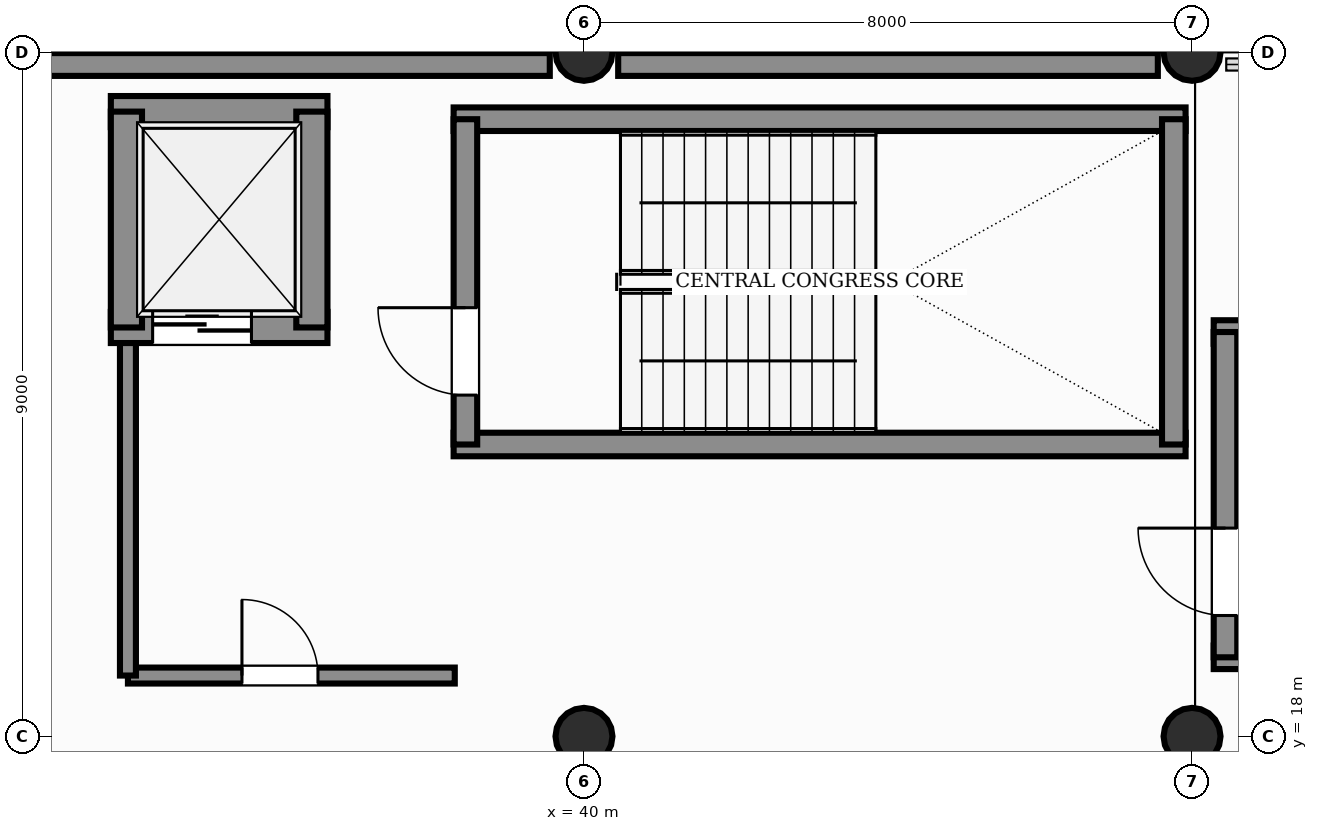
"""IFC4 building model, lengths in metres.
Left out: names, types, materials, properties, quantities, classifications, styles, units other than length and angle.
Written with IfcOpenShell. Run it as: python <this file> out.ifc"""

import sys

from ifc_helpers import new_model, si_unit, direction, frame, frame_2d, origin, origin_2d, place, context, subcontext, project, spatial, rectangle, circle, extrude, element, fill, save


model = new_model("IFC4")
c1 = context("Model", 3, precision=1e-05, world=origin(), true_north=direction((0.0, 1.0)))
c2 = subcontext(c1, "Body", "Model", "MODEL_VIEW")
j1 = project(units=[si_unit("LENGTHUNIT", "METRE"), si_unit("PLANEANGLEUNIT", "RADIAN")], contexts=[c1])
p1 = place(None, origin())
s1 = spatial("IfcSite", under=j1, at=p1, CompositionType="ELEMENT")
p2 = place(p1, origin())
s2 = spatial("IfcBuilding", under=s1, at=p2, CompositionType="ELEMENT")
p3 = place(p2, frame((0.0, 0.0, 16.2)))
s3 = spatial("IfcBuildingStorey", under=s2, at=p3, CompositionType="ELEMENT", Elevation=16.2)
for number, where, z_axis, x_axis in (
    (1, (40.0, 18.0, 0.0), (0.0, 0.0, 1.0), (1.0, 0.0, 0.0)),
    (2, (40.0, 27.0, 0.0), (0.0, 0.0, 1.0), (1.0, 0.0, 0.0)),
    (3, (48.0, 18.0, 0.0), (0.0, 0.0, 1.0), (1.0, 0.0, 0.0)),
    (4, (48.0, 27.0, 0.0), (0.0, 0.0, 1.0), (1.0, 0.0, 0.0)),
):
    element("IfcColumn", number, at=place(p3, frame(where, z_axis=z_axis, x_axis=x_axis)), inside=s3, PredefinedType="COLUMN", context=c2, shape_type="SweptSolid", body=[
        extrude(circle(Radius=0.375, at=origin_2d()), origin(), (0.0, 0.0, 1.0), 4.8),
    ])
for number, where, z_axis, x_axis in (
    (5, (32.45, 26.84, 0.0), (0.0, 0.0, 1.0), (1.0, 0.0, 0.0)),
    (6, (40.45, 26.84, 0.0), (0.0, 0.0, 1.0), (1.0, 0.0, 0.0)),
):
    element("IfcWall", number, at=place(p3, frame(where, z_axis=z_axis, x_axis=x_axis)), inside=s3, PredefinedType="SOLIDWALL", context=c2, shape_type="SweptSolid", body=[
        extrude(rectangle(XDim=7.1, YDim=0.3, at=frame_2d((3.55, 0.0))), origin(), (0.0, 0.0, 1.0), 3.6),
    ])
for number, where, z_axis, x_axis in (
    (7, (38.285, 21.84, 0.0), (0.0, 0.0, 1.0), (1.0, 0.0, 0.0)),
    (8, (38.285, 26.12, 0.0), (0.0, 0.0, 1.0), (1.0, 0.0, 0.0)),
):
    element("IfcWall", number, at=place(p3, frame(where, z_axis=z_axis, x_axis=x_axis)), inside=s3, PredefinedType="SHEAR", context=c2, shape_type="SweptSolid", body=[
        extrude(rectangle(XDim=9.63, YDim=0.31, at=frame_2d((4.815, 0.0))), origin(), (0.0, 0.0, 1.0), 4.8),
    ])
p4 = place(p3, frame((38.44, 21.84, 0.0), z_axis=(0.0, 0.0, 1.0), x_axis=(0.0, 1.0, 0.0)))
e9 = element("IfcWall", 9, at=p4, inside=s3, PredefinedType="SHEAR", context=c2, shape_type="SweptSolid", body=[
    extrude(rectangle(XDim=4.28, YDim=0.31, at=frame_2d((2.14, 0.0))), origin(), (0.0, 0.0, 1.0), 4.8),
])
p5 = place(p4, frame((0.65, 0.0, 0.0)))
e10 = element("IfcOpeningElement", 10, at=p5, cuts=e9, PredefinedType="OPENING", context=c2, shape_type="SweptSolid", body=[
    extrude(rectangle(XDim=1.15, YDim=2.2, at=frame_2d((0.575, 1.1))), frame((0.0, 0.165, 0.0), z_axis=(0.0, -1.0, 0.0), x_axis=(1.0, 0.0, 0.0)), (0.0, 0.0, 1.0), 0.33),
])
p6 = place(p3, frame((47.76, 21.84, 0.0), z_axis=(0.0, 0.0, 1.0), x_axis=(0.0, 1.0, 0.0)))
e11 = element("IfcWall", 11, at=p6, inside=s3, PredefinedType="SHEAR", context=c2, shape_type="SweptSolid", body=[
    extrude(rectangle(XDim=4.28, YDim=0.31, at=frame_2d((2.14, 0.0))), origin(), (0.0, 0.0, 1.0), 4.8),
])
p7 = place(p3, frame((34.0, 18.8, 0.0), z_axis=(0.0, 0.0, 1.0), x_axis=(1.0, 0.0, 0.0)))
e12 = element("IfcWall", 12, at=p7, inside=s3, PredefinedType="PARTITIONING", context=c2, shape_type="SweptSolid", body=[
    extrude(rectangle(XDim=4.3, YDim=0.21, at=frame_2d((2.15, 0.0))), origin(), (0.0, 0.0, 1.0), 3.55),
])
p8 = place(p7, frame((1.5, 0.0, 0.0)))
e13 = element("IfcOpeningElement", 13, at=p8, cuts=e12, PredefinedType="OPENING", context=c2, shape_type="SweptSolid", body=[
    extrude(rectangle(XDim=1.0, YDim=2.15, at=frame_2d((0.5, 1.075))), frame((0.0, 0.115, 0.0), z_axis=(0.0, -1.0, 0.0), x_axis=(1.0, 0.0, 0.0)), (0.0, 0.0, 1.0), 0.23),
])
p9 = place(p3, frame((34.0, 18.8, 0.0), z_axis=(0.0, 0.0, 1.0), x_axis=(0.0, 1.0, 0.0)))
e14 = element("IfcWall", 14, at=p9, inside=s3, PredefinedType="PARTITIONING", context=c2, shape_type="SweptSolid", body=[
    extrude(rectangle(XDim=4.6, YDim=0.21, at=frame_2d((2.3, 0.0))), origin(), (0.0, 0.0, 1.0), 3.55),
])
p10 = place(p3, frame((33.775, 23.38, 0.0), z_axis=(0.0, 0.0, 1.0), x_axis=(1.0, 0.0, 0.0)))
e15 = element("IfcWall", 15, at=p10, inside=s3, PredefinedType="SHEAR", context=c2, shape_type="SweptSolid", body=[
    extrude(rectangle(XDim=2.85, YDim=0.41, at=frame_2d((1.425, 0.0))), origin(), (0.0, 0.0, 1.0), 4.8),
])
p11 = place(p10, frame((0.55, 0.0, 0.0)))
e16 = element("IfcOpeningElement", 16, at=p11, cuts=e15, PredefinedType="OPENING", context=c2, shape_type="SweptSolid", body=[
    extrude(rectangle(XDim=1.3, YDim=2.25, at=frame_2d((0.65, 1.125))), frame((0.0, 0.215, 0.0), z_axis=(0.0, -1.0, 0.0), x_axis=(1.0, 0.0, 0.0)), (0.0, 0.0, 1.0), 0.43),
])
p12 = place(p3, frame((33.775, 26.22, 0.0), z_axis=(0.0, 0.0, 1.0), x_axis=(1.0, 0.0, 0.0)))
e17 = element("IfcWall", 17, at=p12, inside=s3, PredefinedType="SHEAR", context=c2, shape_type="SweptSolid", body=[
    extrude(rectangle(XDim=2.85, YDim=0.41, at=frame_2d((1.425, 0.0))), origin(), (0.0, 0.0, 1.0), 4.8),
])
for number, where, z_axis, x_axis in (
    (18, (33.98, 23.38, 0.0), (0.0, 0.0, 1.0), (0.0, 1.0, 0.0)),
    (19, (36.42, 23.38, 0.0), (0.0, 0.0, 1.0), (0.0, 1.0, 0.0)),
):
    element("IfcWall", number, at=place(p3, frame(where, z_axis=z_axis, x_axis=x_axis)), inside=s3, PredefinedType="SHEAR", context=c2, shape_type="SweptSolid", body=[
        extrude(rectangle(XDim=2.84, YDim=0.41, at=frame_2d((1.42, 0.0))), origin(), (0.0, 0.0, 1.0), 4.8),
    ])
for number, where, z_axis, x_axis in (
    (20, (48.285, 19.04, 0.0), (0.0, 0.0, 1.0), (1.0, 0.0, 0.0)),
    (21, (48.285, 23.32, 0.0), (0.0, 0.0, 1.0), (1.0, 0.0, 0.0)),
):
    element("IfcWall", number, at=place(p3, frame(where, z_axis=z_axis, x_axis=x_axis)), inside=s3, PredefinedType="SHEAR", context=c2, shape_type="SweptSolid", body=[
        extrude(rectangle(XDim=9.63, YDim=0.31, at=frame_2d((4.815, 0.0))), origin(), (0.0, 0.0, 1.0), 4.8),
    ])
p13 = place(p3, frame((48.44, 19.04, 0.0), z_axis=(0.0, 0.0, 1.0), x_axis=(0.0, 1.0, 0.0)))
e22 = element("IfcWall", 22, at=p13, inside=s3, PredefinedType="SHEAR", context=c2, shape_type="SweptSolid", body=[
    extrude(rectangle(XDim=4.28, YDim=0.31, at=frame_2d((2.14, 0.0))), origin(), (0.0, 0.0, 1.0), 4.8),
])
p14 = place(p13, frame((0.55, 0.0, 0.0)))
e23 = element("IfcOpeningElement", 23, at=p14, cuts=e22, PredefinedType="OPENING", context=c2, shape_type="SweptSolid", body=[
    extrude(rectangle(XDim=1.15, YDim=2.2, at=frame_2d((0.575, 1.1))), frame((0.0, 0.165, 0.0), z_axis=(0.0, -1.0, 0.0), x_axis=(1.0, 0.0, 0.0)), (0.0, 0.0, 1.0), 0.33),
])
p15 = place(p5, origin())
e24 = element("IfcDoor", 24, at=p15, inside=s3, OperationType="SINGLE_SWING_RIGHT", PredefinedType="DOOR", context=c2, shape_type="SweptSolid", body=[
    extrude(rectangle(XDim=1.15, YDim=2.2, at=frame_2d((0.575, 1.1))), frame((0.0, 0.025, 0.0), z_axis=(0.0, -1.0, 0.0), x_axis=(1.0, 0.0, 0.0)), (0.0, 0.0, 1.0), 0.05),
])
fill(e10, e24)
p16 = place(p8, origin())
e25 = element("IfcDoor", 25, at=p16, inside=s3, OperationType="SINGLE_SWING_LEFT", PredefinedType="DOOR", context=c2, shape_type="SweptSolid", body=[
    extrude(rectangle(XDim=1.0, YDim=2.15, at=frame_2d((0.5, 1.075))), frame((0.0, 0.025, 0.0), z_axis=(0.0, -1.0, 0.0), x_axis=(1.0, 0.0, 0.0)), (0.0, 0.0, 1.0), 0.05),
])
fill(e13, e25)
p17 = place(p11, origin())
e26 = element("IfcDoor", 26, at=p17, inside=s3, OperationType="DOUBLE_DOOR_SLIDING", PredefinedType="DOOR", context=c2, shape_type="SweptSolid", body=[
    extrude(rectangle(XDim=1.3, YDim=2.25, at=frame_2d((0.65, 1.125))), frame((0.0, 0.025, 0.0), z_axis=(0.0, -1.0, 0.0), x_axis=(1.0, 0.0, 0.0)), (0.0, 0.0, 1.0), 0.05),
])
fill(e16, e26)
p18 = place(p14, origin())
e27 = element("IfcDoor", 27, at=p18, inside=s3, OperationType="SINGLE_SWING_RIGHT", PredefinedType="DOOR", context=c2, shape_type="SweptSolid", body=[
    extrude(rectangle(XDim=1.15, YDim=2.2, at=frame_2d((0.575, 1.1))), frame((0.0, 0.025, 0.0), z_axis=(0.0, -1.0, 0.0), x_axis=(1.0, 0.0, 0.0)), (0.0, 0.0, 1.0), 0.05),
])
fill(e23, e27)
save(model, sys.argv[1])
